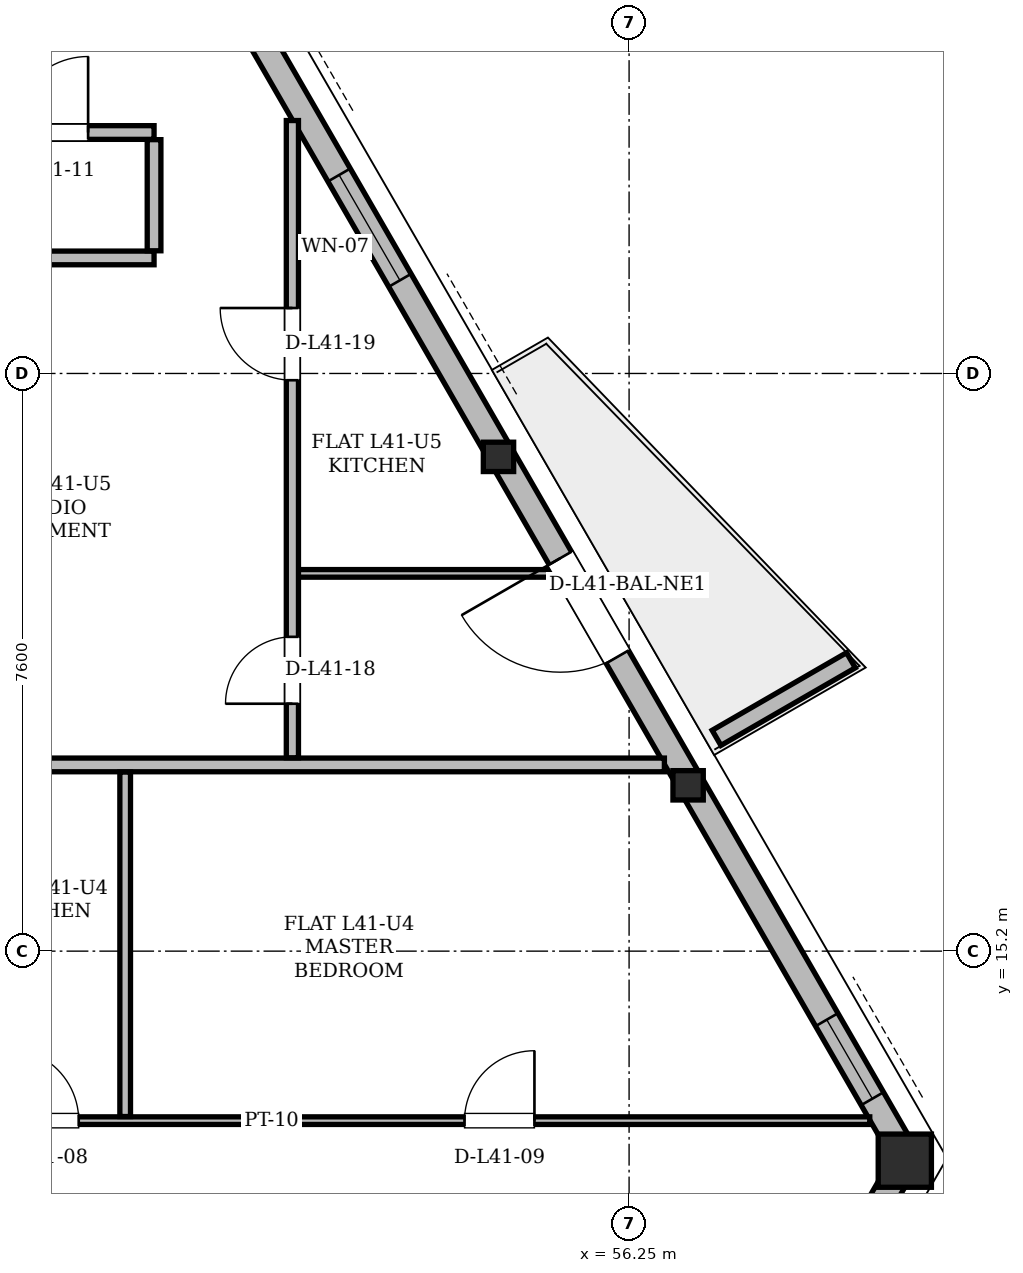
"""IFC4 building model, lengths in metres.
Left out: names, types, materials, properties, quantities, classifications, styles, units other than length and angle.
Written with IfcOpenShell. Run it as: python <this file> out.ifc"""

import sys

from ifc_helpers import new_model, si_unit, direction, frame, frame_2d, origin, origin_2d, place, context, subcontext, project, spatial, polyline, rectangle, hollow_rectangle, i_section, outline, extrude, element, fill, save


model = new_model("IFC4")
c1 = context("Model", 3, precision=1e-05, world=origin(), true_north=direction((0.0, 1.0)))
c2 = subcontext(c1, "Body", "Model", "MODEL_VIEW")
j1 = project(units=[si_unit("LENGTHUNIT", "METRE"), si_unit("PLANEANGLEUNIT", "RADIAN")], contexts=[c1])
p1 = place(None, origin())
s1 = spatial("IfcSite", under=j1, at=p1, CompositionType="ELEMENT")
p2 = place(p1, origin())
s2 = spatial("IfcBuilding", under=s1, at=p2, CompositionType="ELEMENT")
p3 = place(p2, frame((0.0, 0.0, 156.6)))
s3 = spatial("IfcBuildingStorey", under=s2, at=p3, CompositionType="ELEMENT", Elevation=156.6)
p4 = place(p3, frame((59.902, 12.477, 0.004), z_axis=(-0.013729429674, -0.018555120301, 0.999733569643), x_axis=(0.803870057884, -0.594804951255, 0.0)))
e1 = element("IfcColumn", 1, at=p4, inside=s3, PredefinedType="COLUMN", context=c2, shape_type="SweptSolid", body=[
    extrude(hollow_rectangle(XDim=0.7, YDim=0.7, WallThickness=0.055, at=origin_2d()), origin(), (0.0, 0.0, 1.0), 3.592),
])
p5 = place(p3, frame((57.054, 17.41, 0.004), z_axis=(-0.0151570935, -0.016040690879, 0.999756449718), x_axis=(0.726842306935, -0.686804383248, 0.0)))
e2 = element("IfcColumn", 2, at=p5, inside=s3, PredefinedType="COLUMN", context=c2, shape_type="SweptSolid", body=[
    extrude(i_section(OverallWidth=0.399, OverallDepth=0.386, WebThickness=0.021, FlangeThickness=0.033, at=origin_2d()), origin(), (0.0, 0.0, 1.0), 3.592),
])
p6 = place(p3, frame((54.561, 21.727, 0.004), z_axis=(-0.01644873519, -0.013729935985, 0.999770437635), x_axis=(0.640808251005, -0.767700973976, 0.0)))
e3 = element("IfcColumn", 3, at=p6, inside=s3, PredefinedType="COLUMN", context=c2, shape_type="SweptSolid", body=[
    extrude(i_section(OverallWidth=0.399, OverallDepth=0.386, WebThickness=0.021, FlangeThickness=0.033, at=origin_2d()), origin(), (0.0, 0.0, 1.0), 3.592),
])
p7 = place(p3, frame((55.303, 4.511, 0.0), z_axis=(0.0, 0.0, 1.0), x_axis=(0.500004288242, 0.866022927952, 0.0)))
e4 = element("IfcWall", 4, at=p7, inside=s3, PredefinedType="SOLIDWALL", context=c2, shape_type="SweptSolid", body=[
    extrude(rectangle(XDim=9.198, YDim=0.34, at=frame_2d((4.599, 0.0))), origin(), (0.0, 0.0, 1.0), 2.6),
])
p8 = place(p3, frame((59.902, 12.477, 0.0), z_axis=(0.0, 0.0, 1.0), x_axis=(-0.499998839087, 0.866026074037, 0.0)))
e5 = element("IfcWall", 5, at=p8, inside=s3, PredefinedType="SOLIDWALL", context=c2, shape_type="SweptSolid", body=[
    extrude(rectangle(XDim=35.606, YDim=0.34, at=frame_2d((17.803, 0.0))), origin(), (0.0, 0.0, 1.0), 2.6),
])
p9 = place(p8, frame((7.615, 0.0, 0.0)))
e6 = element("IfcOpeningElement", 6, at=p9, cuts=e5, PredefinedType="OPENING", context=c2, shape_type="SweptSolid", body=[
    extrude(rectangle(XDim=1.5, YDim=2.2, at=frame_2d((0.75, 1.1))), frame((0.0, 0.17, 0.0), z_axis=(0.0, -1.0, 0.0), x_axis=(1.0, 0.0, 0.0)), (0.0, 0.0, 1.0), 0.34),
])
p10 = place(p8, frame((30.887, 0.0, 0.0)))
e7 = element("IfcOpeningElement", 7, at=p10, cuts=e5, PredefinedType="OPENING", context=c2, shape_type="SweptSolid", body=[
    extrude(rectangle(XDim=1.5, YDim=2.2, at=frame_2d((0.75, 1.1))), frame((0.0, 0.17, 0.0), z_axis=(0.0, -1.0, 0.0), x_axis=(1.0, 0.0, 0.0)), (0.0, 0.0, 1.0), 0.34),
])
p11 = place(p8, frame((0.903, 0.0, 0.85)))
e8 = element("IfcOpeningElement", 8, at=p11, cuts=e5, PredefinedType="OPENING", context=c2, shape_type="SweptSolid", body=[
    extrude(rectangle(XDim=1.2, YDim=1.48, at=frame_2d((0.6, 0.74))), frame((0.0, 0.17, 0.0), z_axis=(0.0, -1.0, 0.0), x_axis=(1.0, 0.0, 0.0)), (0.0, 0.0, 1.0), 0.34),
])
p12 = place(p8, frame((17.144, 0.0, 0.85)))
e9 = element("IfcOpeningElement", 9, at=p12, cuts=e5, PredefinedType="OPENING", context=c2, shape_type="SweptSolid", body=[
    extrude(rectangle(XDim=2.6, YDim=1.64, at=frame_2d((1.3, 0.82))), frame((0.0, 0.17, 0.0), z_axis=(0.0, -1.0, 0.0), x_axis=(1.0, 0.0, 0.0)), (0.0, 0.0, 1.0), 0.34),
])
p13 = place(p8, frame((22.144, 0.0, 0.85)))
e10 = element("IfcOpeningElement", 10, at=p13, cuts=e5, PredefinedType="OPENING", context=c2, shape_type="SweptSolid", body=[
    extrude(rectangle(XDim=2.0, YDim=1.64, at=frame_2d((1.0, 0.82))), frame((0.0, 0.17, 0.0), z_axis=(0.0, -1.0, 0.0), x_axis=(1.0, 0.0, 0.0)), (0.0, 0.0, 1.0), 0.34),
])
p14 = place(p8, frame((13.335, 0.0, 0.85)))
e11 = element("IfcOpeningElement", 11, at=p14, cuts=e5, PredefinedType="OPENING", context=c2, shape_type="SweptSolid", body=[
    extrude(rectangle(XDim=1.6, YDim=1.64, at=frame_2d((0.8, 0.82))), frame((0.0, 0.17, 0.0), z_axis=(0.0, -1.0, 0.0), x_axis=(1.0, 0.0, 0.0)), (0.0, 0.0, 1.0), 0.34),
])
p15 = place(p8, frame((25.813, 0.0, 0.85)))
e12 = element("IfcOpeningElement", 12, at=p15, cuts=e5, PredefinedType="OPENING", context=c2, shape_type="SweptSolid", body=[
    extrude(rectangle(XDim=1.6, YDim=1.64, at=frame_2d((0.8, 0.82))), frame((0.0, 0.17, 0.0), z_axis=(0.0, -1.0, 0.0), x_axis=(1.0, 0.0, 0.0)), (0.0, 0.0, 1.0), 0.34),
])
p16 = place(p8, frame((33.272, 0.0, 0.85)))
e13 = element("IfcOpeningElement", 13, at=p16, cuts=e5, PredefinedType="OPENING", context=c2, shape_type="SweptSolid", body=[
    extrude(rectangle(XDim=1.2, YDim=1.48, at=frame_2d((0.6, 0.74))), frame((0.0, 0.17, 0.0), z_axis=(0.0, -1.0, 0.0), x_axis=(1.0, 0.0, 0.0)), (0.0, 0.0, 1.0), 0.34),
])
p17 = place(p3, frame((57.4, 18.006, 0.0), z_axis=(0.0, 0.0, 1.0), x_axis=(0.866042246008, 0.499970827278, 0.0)))
e14 = element("IfcWall", 14, at=p17, inside=s3, PredefinedType="PARAPET", context=c2, shape_type="SweptSolid", body=[
    extrude(outline(polyline([(0.0, 0.0), (2.042, 0.0), (2.042, 1.1), (0.0, 1.32), (0.0, 0.0)])), frame((0.0, 0.115, 0.0), z_axis=(0.0, -1.0, 0.0), x_axis=(1.0, 0.0, 0.0)), (0.0, 0.0, 1.0), 0.23),
])
p18 = place(p3, frame((45.514, 12.97, 0.0), z_axis=(0.0, 0.0, 1.0), x_axis=(1.0, 0.0, 0.0)))
e15 = element("IfcWall", 15, at=p18, inside=s3, PredefinedType="PARTITIONING", context=c2, shape_type="SweptSolid", body=[
    extrude(rectangle(XDim=13.903, YDim=0.1, at=frame_2d((6.951, 0.0))), origin(), (0.0, 0.0, 1.0), 2.42),
])
p19 = place(p18, frame((0.536, 0.0, 0.0)))
e16 = element("IfcOpeningElement", 16, at=p19, cuts=e15, PredefinedType="OPENING", context=c2, shape_type="SweptSolid", body=[
    extrude(rectangle(XDim=0.88, YDim=2.08, at=frame_2d((0.44, 1.04))), frame((0.0, 0.05, 0.0), z_axis=(0.0, -1.0, 0.0), x_axis=(1.0, 0.0, 0.0)), (0.0, 0.0, 1.0), 0.1),
])
p20 = place(p18, frame((2.545, 0.0, 0.0)))
e17 = element("IfcOpeningElement", 17, at=p20, cuts=e15, PredefinedType="OPENING", context=c2, shape_type="SweptSolid", body=[
    extrude(rectangle(XDim=0.95, YDim=2.1, at=frame_2d((0.475, 1.05))), frame((0.0, 0.05, 0.0), z_axis=(0.0, -1.0, 0.0), x_axis=(1.0, 0.0, 0.0)), (0.0, 0.0, 1.0), 0.1),
])
p21 = place(p18, frame((8.571, 0.0, 0.0)))
e18 = element("IfcOpeningElement", 18, at=p21, cuts=e15, PredefinedType="OPENING", context=c2, shape_type="SweptSolid", body=[
    extrude(rectangle(XDim=0.92, YDim=2.12, at=frame_2d((0.46, 1.06))), frame((0.0, 0.05, 0.0), z_axis=(0.0, -1.0, 0.0), x_axis=(1.0, 0.0, 0.0)), (0.0, 0.0, 1.0), 0.1),
])
p22 = place(p3, frame((45.514, 17.65, 0.0), z_axis=(0.0, 0.0, 1.0), x_axis=(1.0, 0.0, 0.0)))
e19 = element("IfcWall", 19, at=p22, inside=s3, PredefinedType="PARTITIONING", context=c2, shape_type="SweptSolid", body=[
    extrude(rectangle(XDim=11.201, YDim=0.18, at=frame_2d((5.6, 0.0))), origin(), (0.0, 0.0, 1.0), 2.42),
])
p23 = place(p3, frame((51.822, 20.17, 0.0), z_axis=(0.0, 0.0, 1.0), x_axis=(1.0, 0.0, 0.0)))
e20 = element("IfcWall", 20, at=p23, inside=s3, PredefinedType="PARTITIONING", context=c2, shape_type="SweptSolid", body=[
    extrude(rectangle(XDim=3.438, YDim=0.1, at=frame_2d((1.719, 0.0))), origin(), (0.0, 0.0, 1.0), 3.38),
])
p24 = place(p3, frame((46.04, 24.32, 0.0), z_axis=(0.0, 0.0, 1.0), x_axis=(1.0, 0.0, 0.0)))
e21 = element("IfcWall", 21, at=p24, inside=s3, PredefinedType="PARTITIONING", context=c2, shape_type="SweptSolid", body=[
    extrude(rectangle(XDim=3.96, YDim=0.18, at=frame_2d((1.98, 0.0))), origin(), (0.0, 0.0, 1.0), 3.38),
])
p25 = place(p3, frame((38.3, 25.97, 0.0), z_axis=(0.0, 0.0, 1.0), x_axis=(1.0, 0.0, 0.0)))
e22 = element("IfcWall", 22, at=p25, inside=s3, PredefinedType="PARTITIONING", context=c2, shape_type="SweptSolid", body=[
    extrude(rectangle(XDim=11.7, YDim=0.18, at=frame_2d((5.85, 0.0))), origin(), (0.0, 0.0, 1.0), 2.842),
])
p26 = place(p25, frame((9.832, 0.0, 0.0)))
e23 = element("IfcOpeningElement", 23, at=p26, cuts=e22, PredefinedType="OPENING", context=c2, shape_type="SweptSolid", body=[
    extrude(rectangle(XDim=1.0, YDim=2.18, at=frame_2d((0.5, 1.09))), frame((0.0, 0.09, 0.0), z_axis=(0.0, -1.0, 0.0), x_axis=(1.0, 0.0, 0.0)), (0.0, 0.0, 1.0), 0.18),
])
p27 = place(p3, frame((49.62, 13.024, 0.0), z_axis=(0.0, 0.0, 1.0), x_axis=(0.0, 1.0, 0.0)))
e24 = element("IfcWall", 24, at=p27, inside=s3, PredefinedType="PARTITIONING", context=c2, shape_type="SweptSolid", body=[
    extrude(rectangle(XDim=4.532, YDim=0.14, at=frame_2d((2.266, 0.0))), origin(), (0.0, 0.0, 1.0), 3.38),
])
p28 = place(p3, frame((50.0, 24.414, 0.0), z_axis=(0.0, 0.0, 1.0), x_axis=(0.0, 1.0, 0.0)))
e25 = element("IfcWall", 25, at=p28, inside=s3, PredefinedType="PARTITIONING", context=c2, shape_type="SweptSolid", body=[
    extrude(rectangle(XDim=1.462, YDim=0.18, at=frame_2d((0.731, 0.0))), origin(), (0.0, 0.0, 1.0), 3.38),
])
p29 = place(p3, frame((51.82, 17.744, 0.0), z_axis=(0.0, 0.0, 1.0), x_axis=(0.0, 1.0, 0.0)))
e26 = element("IfcWall", 26, at=p29, inside=s3, PredefinedType="PARTITIONING", context=c2, shape_type="SweptSolid", body=[
    extrude(rectangle(XDim=8.384, YDim=0.16, at=frame_2d((4.192, 0.0))), origin(), (0.0, 0.0, 1.0), 3.38),
])
p30 = place(p29, frame((0.711, 0.0, 0.0)))
e27 = element("IfcOpeningElement", 27, at=p30, cuts=e26, PredefinedType="OPENING", context=c2, shape_type="SweptSolid", body=[
    extrude(rectangle(XDim=0.88, YDim=2.08, at=frame_2d((0.44, 1.04))), frame((0.0, 0.08, 0.0), z_axis=(0.0, -1.0, 0.0), x_axis=(1.0, 0.0, 0.0)), (0.0, 0.0, 1.0), 0.16),
])
p31 = place(p29, frame((4.967, 0.0, 0.0)))
e28 = element("IfcOpeningElement", 28, at=p31, cuts=e26, PredefinedType="OPENING", context=c2, shape_type="SweptSolid", body=[
    extrude(rectangle(XDim=0.95, YDim=2.1, at=frame_2d((0.475, 1.05))), frame((0.0, 0.08, 0.0), z_axis=(0.0, -1.0, 0.0), x_axis=(1.0, 0.0, 0.0)), (0.0, 0.0, 1.0), 0.16),
])
p32 = place(p9, origin())
e29 = element("IfcDoor", 29, at=p32, inside=s3, OperationType="SINGLE_SWING_RIGHT", PredefinedType="DOOR", context=c2, shape_type="SweptSolid", body=[
    extrude(rectangle(XDim=1.5, YDim=2.2, at=frame_2d((0.75, 1.1))), frame((0.0, 0.025, 0.0), z_axis=(0.0, -1.0, 0.0), x_axis=(1.0, 0.0, 0.0)), (0.0, 0.0, 1.0), 0.05),
])
fill(e6, e29)
p33 = place(p11, origin())
e30 = element("IfcWindow", 30, at=p33, inside=s3, PartitioningType="SINGLE_PANEL", PredefinedType="WINDOW", context=c2, shape_type="SweptSolid", body=[
    extrude(rectangle(XDim=1.2, YDim=1.48, at=frame_2d((0.6, 0.74))), frame((0.0, 0.03, 0.0), z_axis=(0.0, -1.0, 0.0), x_axis=(1.0, 0.0, 0.0)), (0.0, 0.0, 1.0), 0.06),
])
fill(e8, e30)
p34 = place(p14, origin())
e31 = element("IfcWindow", 31, at=p34, inside=s3, PartitioningType="SINGLE_PANEL", PredefinedType="WINDOW", context=c2, shape_type="SweptSolid", body=[
    extrude(rectangle(XDim=1.6, YDim=1.64, at=frame_2d((0.8, 0.82))), frame((0.0, 0.03, 0.0), z_axis=(0.0, -1.0, 0.0), x_axis=(1.0, 0.0, 0.0)), (0.0, 0.0, 1.0), 0.06),
])
fill(e11, e31)
p35 = place(p20, origin())
e32 = element("IfcDoor", 32, at=p35, inside=s3, OperationType="SINGLE_SWING_LEFT", PredefinedType="DOOR", context=c2, shape_type="SweptSolid", body=[
    extrude(rectangle(XDim=0.95, YDim=2.1, at=frame_2d((0.475, 1.05))), frame((0.0, 0.025, 0.0), z_axis=(0.0, -1.0, 0.0), x_axis=(1.0, 0.0, 0.0)), (0.0, 0.0, 1.0), 0.05),
])
fill(e17, e32)
p36 = place(p21, origin())
e33 = element("IfcDoor", 33, at=p36, inside=s3, OperationType="SINGLE_SWING_RIGHT", PredefinedType="DOOR", context=c2, shape_type="SweptSolid", body=[
    extrude(rectangle(XDim=0.92, YDim=2.12, at=frame_2d((0.46, 1.06))), frame((0.0, 0.025, 0.0), z_axis=(0.0, -1.0, 0.0), x_axis=(1.0, 0.0, 0.0)), (0.0, 0.0, 1.0), 0.05),
])
fill(e18, e33)
p37 = place(p26, origin())
e34 = element("IfcDoor", 34, at=p37, inside=s3, OperationType="SINGLE_SWING_RIGHT", PredefinedType="DOOR", context=c2, shape_type="SweptSolid", body=[
    extrude(rectangle(XDim=1.0, YDim=2.18, at=frame_2d((0.5, 1.09))), frame((0.0, 0.025, 0.0), z_axis=(0.0, -1.0, 0.0), x_axis=(1.0, 0.0, 0.0)), (0.0, 0.0, 1.0), 0.05),
])
fill(e23, e34)
p38 = place(p30, origin())
e35 = element("IfcDoor", 35, at=p38, inside=s3, OperationType="SINGLE_SWING_LEFT", PredefinedType="DOOR", context=c2, shape_type="SweptSolid", body=[
    extrude(rectangle(XDim=0.88, YDim=2.08, at=frame_2d((0.44, 1.04))), frame((0.0, 0.025, 0.0), z_axis=(0.0, -1.0, 0.0), x_axis=(1.0, 0.0, 0.0)), (0.0, 0.0, 1.0), 0.05),
])
fill(e27, e35)
p39 = place(p31, origin())
e36 = element("IfcDoor", 36, at=p39, inside=s3, OperationType="SINGLE_SWING_RIGHT", PredefinedType="DOOR", context=c2, shape_type="SweptSolid", body=[
    extrude(rectangle(XDim=0.95, YDim=2.1, at=frame_2d((0.475, 1.05))), frame((0.0, 0.025, 0.0), z_axis=(0.0, -1.0, 0.0), x_axis=(1.0, 0.0, 0.0)), (0.0, 0.0, 1.0), 0.05),
])
fill(e28, e36)
save(model, sys.argv[1])
